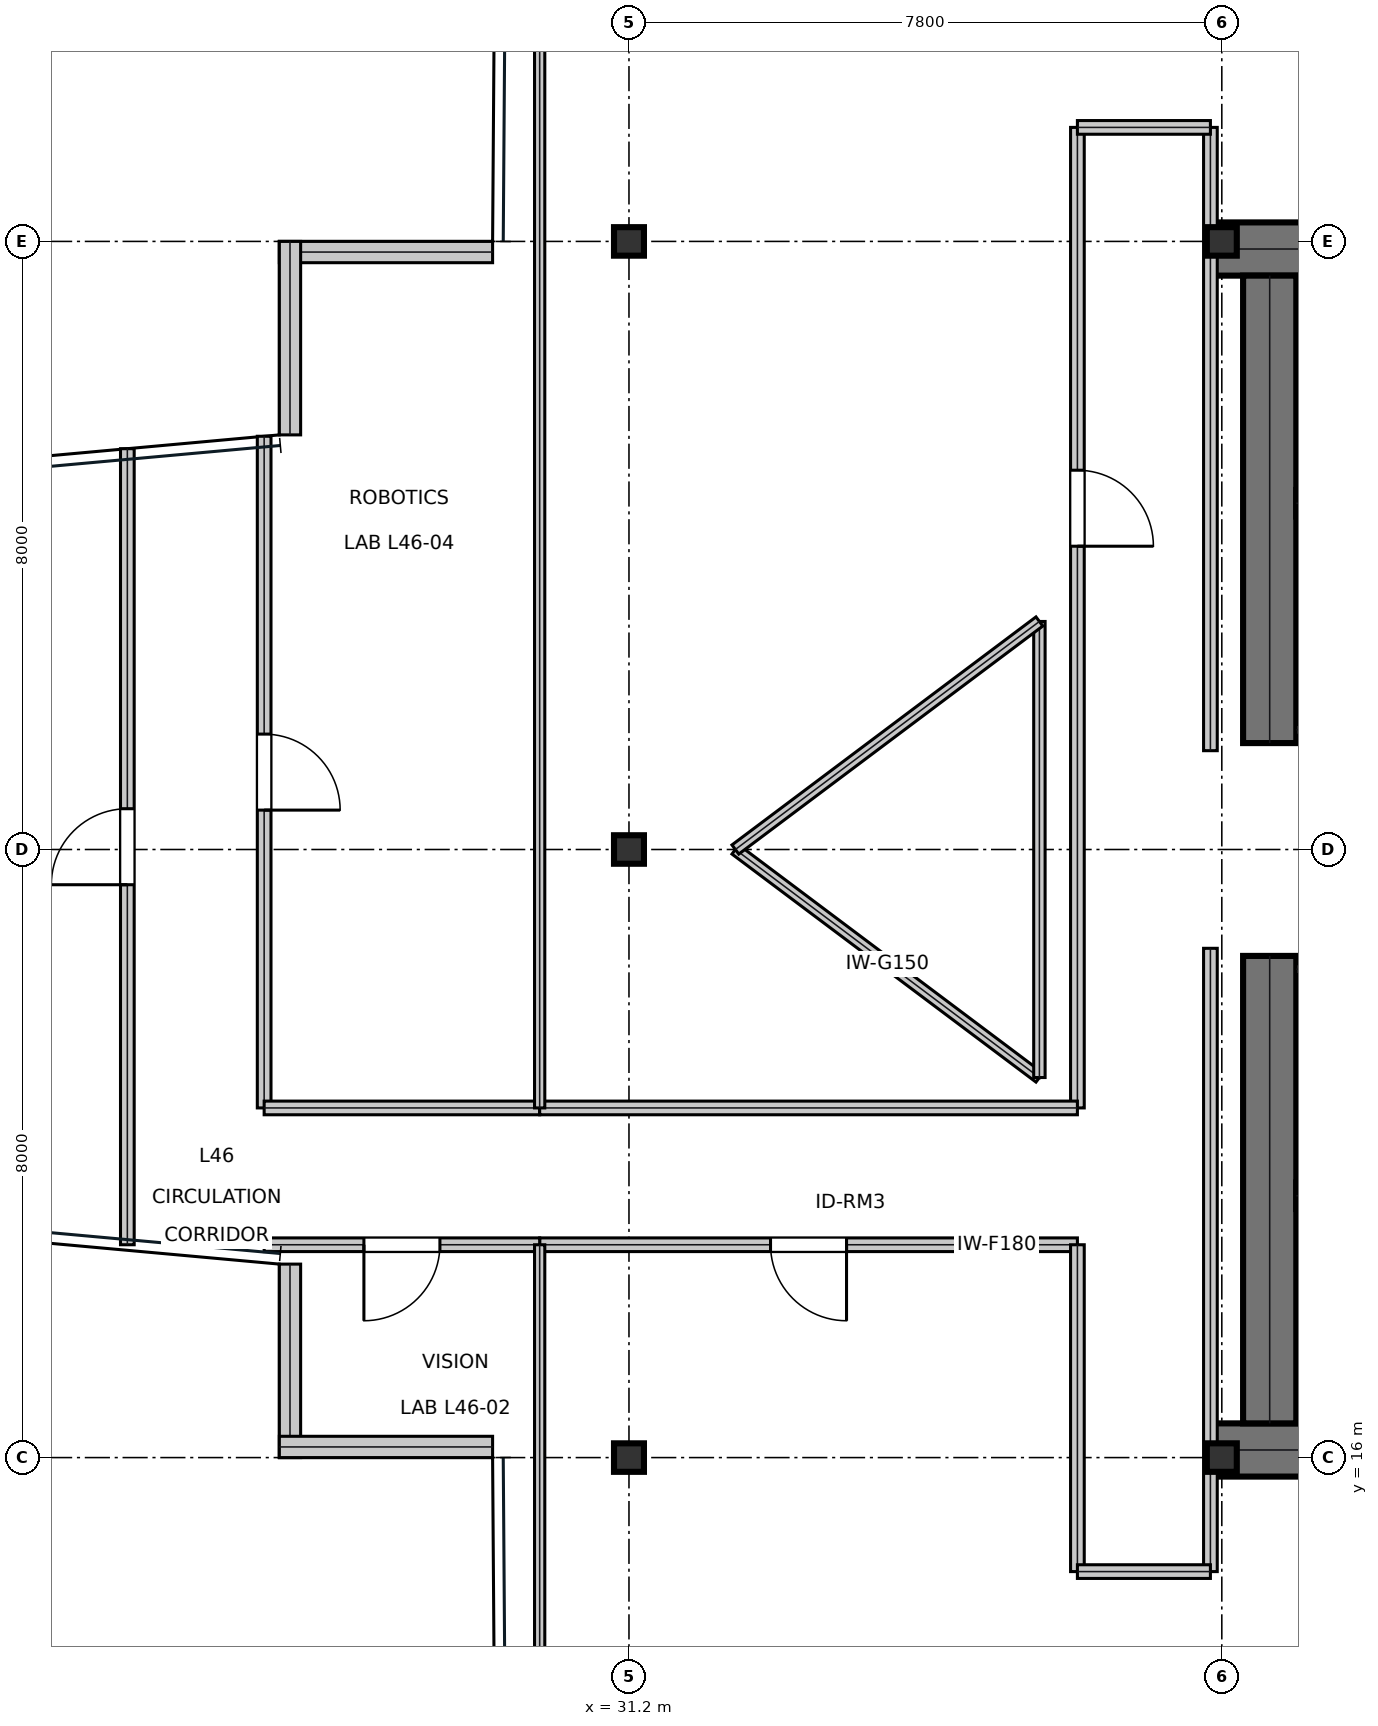
"""IFC4 building model, lengths in metres.
Left out: names, types, materials, properties, quantities, classifications, styles, units other than length and angle.
Written with IfcOpenShell. Run it as: python <this file> out.ifc"""

import sys

from ifc_helpers import new_model, si_unit, direction, frame, frame_2d, origin, origin_2d, place, context, subcontext, project, spatial, rectangle, i_section, extrude, element, fill, save


model = new_model("IFC4")
c1 = context("Model", 3, precision=1e-05, world=origin(), true_north=direction((0.0, 1.0)))
c2 = subcontext(c1, "Body", "Model", "MODEL_VIEW")
j1 = project(units=[si_unit("LENGTHUNIT", "METRE"), si_unit("PLANEANGLEUNIT", "RADIAN")], contexts=[c1])
p1 = place(None, origin())
s1 = spatial("IfcSite", under=j1, at=p1, CompositionType="ELEMENT")
p2 = place(p1, origin())
s2 = spatial("IfcBuilding", under=s1, at=p2, CompositionType="ELEMENT")
p3 = place(p2, frame((0.0, 0.0, 199.95)))
s3 = spatial("IfcBuildingStorey", under=s2, at=p3, CompositionType="ELEMENT", Elevation=199.95)
for number, where, z_axis, x_axis in (
    (1, (38.8, 31.9, 0.0), (0.0, 0.0, 1.0), (1.0, 0.0, 0.0)),
    (2, (38.8, 16.1, 0.0), (0.0, 0.0, 1.0), (1.0, 0.0, 0.0)),
):
    element("IfcWall", number, at=place(p3, frame(where, z_axis=z_axis, x_axis=x_axis)), inside=s3, PredefinedType="SHEAR", context=c2, shape_type="SweptSolid", body=[
        extrude(rectangle(XDim=16.0, YDim=0.7, at=frame_2d((8.0, 0.0))), origin(), (0.0, 0.0, 1.0), 3.79),
    ])
for number, where, z_axis, x_axis in (
    (3, (39.63, 16.45, 0.0), (0.0, 0.0, 1.0), (0.0, 1.0, 0.0)),
    (4, (39.63, 25.4, 0.0), (0.0, 0.0, 1.0), (0.0, 1.0, 0.0)),
):
    element("IfcWall", number, at=place(p3, frame(where, z_axis=z_axis, x_axis=x_axis)), inside=s3, PredefinedType="SHEAR", context=c2, shape_type="SweptSolid", body=[
        extrude(rectangle(XDim=6.15, YDim=0.7, at=frame_2d((3.075, 0.0))), origin(), (0.0, 0.0, 1.0), 3.79),
    ])
p4 = place(p3, frame((39.98, 28.555, 0.0), z_axis=(0.0, 0.0, 1.0), x_axis=(1.0, 0.0, 0.0)))
e5 = element("IfcWall", 5, at=p4, inside=s3, PredefinedType="SHEAR", context=c2, shape_type="SweptSolid", body=[
    extrude(rectangle(XDim=7.71, YDim=0.35, at=frame_2d((3.855, 0.0))), origin(), (0.0, 0.0, 1.0), 3.79),
])
p5 = place(p4, frame((0.25, 0.0, 0.0)))
e6 = element("IfcOpeningElement", 6, at=p5, cuts=e5, PredefinedType="OPENING", context=c2, shape_type="SweptSolid", body=[
    extrude(rectangle(XDim=1.1, YDim=2.15, at=frame_2d((0.55, 1.075))), frame((0.0, 0.185, 0.0), z_axis=(0.0, -1.0, 0.0), x_axis=(1.0, 0.0, 0.0)), (0.0, 0.0, 1.0), 0.37),
])
p6 = place(p3, frame((39.98, 19.445, 0.0), z_axis=(0.0, 0.0, 1.0), x_axis=(1.0, 0.0, 0.0)))
e7 = element("IfcWall", 7, at=p6, inside=s3, PredefinedType="SHEAR", context=c2, shape_type="SweptSolid", body=[
    extrude(rectangle(XDim=7.71, YDim=0.35, at=frame_2d((3.855, 0.0))), origin(), (0.0, 0.0, 1.0), 3.79),
])
p7 = place(p6, frame((0.25, 0.0, 0.0)))
e8 = element("IfcOpeningElement", 8, at=p7, cuts=e7, PredefinedType="OPENING", context=c2, shape_type="SweptSolid", body=[
    extrude(rectangle(XDim=1.1, YDim=2.15, at=frame_2d((0.55, 1.075))), frame((0.0, 0.185, 0.0), z_axis=(0.0, -1.0, 0.0), x_axis=(1.0, 0.0, 0.0)), (0.0, 0.0, 1.0), 0.37),
])
for number, where, z_axis, x_axis in (
    (9, (31.2, 16.0, 0.0), (0.0, 0.0, 1.0), (1.0, 0.0, 0.0)),
    (10, (31.2, 24.0, 0.0), (0.0, 0.0, 1.0), (1.0, 0.0, 0.0)),
    (11, (31.2, 32.0, 0.0), (0.0, 0.0, 1.0), (1.0, 0.0, 0.0)),
    (12, (39.0, 16.0, 0.0), (0.0, 0.0, 1.0), (1.0, 0.0, 0.0)),
    (13, (39.0, 32.0, 0.0), (0.0, 0.0, 1.0), (1.0, 0.0, 0.0)),
):
    element("IfcColumn", number, at=place(p3, frame(where, z_axis=z_axis, x_axis=x_axis)), inside=s3, PredefinedType="COLUMN", context=c2, shape_type="SweptSolid", body=[
        extrude(i_section(OverallWidth=0.394, OverallDepth=0.375, WebThickness=0.017, FlangeThickness=0.028, at=origin_2d()), origin(), (0.0, 0.0, 1.0), 4.044),
    ])
p8 = place(p3, frame((29.406, 31.86, 0.0), z_axis=(0.0, 0.0, 1.0), x_axis=(-1.0, 0.0, 0.0)))
e14 = element("IfcWall", 14, at=p8, inside=s3, PredefinedType="STANDARD", context=c2, shape_type="SweptSolid", body=[
    extrude(rectangle(XDim=2.806, YDim=0.28, at=frame_2d((1.403, 0.0))), origin(), (0.0, 0.0, 1.0), 3.79),
])
for number, where, z_axis, x_axis in (
    (15, (26.74, 32.0, 0.0), (0.0, 0.0, 1.0), (0.0, -1.0, 0.0)),
    (16, (26.74, 18.545, 0.0), (0.0, 0.0, 1.0), (0.0, -1.0, 0.0)),
):
    element("IfcWall", number, at=place(p3, frame(where, z_axis=z_axis, x_axis=x_axis)), inside=s3, PredefinedType="STANDARD", context=c2, shape_type="SweptSolid", body=[
        extrude(rectangle(XDim=2.545, YDim=0.28, at=frame_2d((1.273, 0.0))), origin(), (0.0, 0.0, 1.0), 3.319),
    ])
p9 = place(p3, frame((26.6, 16.14, 0.0), z_axis=(0.0, 0.0, 1.0), x_axis=(1.0, 0.0, 0.0)))
e17 = element("IfcWall", 17, at=p9, inside=s3, PredefinedType="STANDARD", context=c2, shape_type="SweptSolid", body=[
    extrude(rectangle(XDim=2.806, YDim=0.28, at=frame_2d((1.403, 0.0))), origin(), (0.0, 0.0, 1.0), 3.79),
])
p10 = place(p3, frame((39.98, 25.575, 0.0), z_axis=(0.0, 0.0, 1.0), x_axis=(1.0, 0.0, 0.0)))
e18 = element("IfcWall", 18, at=p10, inside=s3, PredefinedType="PARTITIONING", context=c2, shape_type="SweptSolid", body=[
    extrude(rectangle(XDim=5.9, YDim=0.15, at=frame_2d((2.95, 0.0))), origin(), (0.0, 0.0, 1.0), 3.79),
])
p11 = place(p10, frame((2.35, 0.0, 0.0)))
e19 = element("IfcOpeningElement", 19, at=p11, cuts=e18, PredefinedType="OPENING", context=c2, shape_type="SweptSolid", body=[
    extrude(rectangle(XDim=1.05, YDim=2.15, at=frame_2d((0.525, 1.075))), frame((0.0, 0.085, 0.0), z_axis=(0.0, -1.0, 0.0), x_axis=(1.0, 0.0, 0.0)), (0.0, 0.0, 1.0), 0.17),
])
p12 = place(p3, frame((39.98, 22.425, 0.0), z_axis=(0.0, 0.0, 1.0), x_axis=(1.0, 0.0, 0.0)))
e20 = element("IfcWall", 20, at=p12, inside=s3, PredefinedType="PARTITIONING", context=c2, shape_type="SweptSolid", body=[
    extrude(rectangle(XDim=5.9, YDim=0.15, at=frame_2d((2.95, 0.0))), origin(), (0.0, 0.0, 1.0), 3.79),
])
p13 = place(p12, frame((2.35, 0.0, 0.0)))
e21 = element("IfcOpeningElement", 21, at=p13, cuts=e20, PredefinedType="OPENING", context=c2, shape_type="SweptSolid", body=[
    extrude(rectangle(XDim=1.05, YDim=2.15, at=frame_2d((0.525, 1.075))), frame((0.0, 0.085, 0.0), z_axis=(0.0, -1.0, 0.0), x_axis=(1.0, 0.0, 0.0)), (0.0, 0.0, 1.0), 0.17),
])
p14 = place(p3, frame((30.025, 18.8, 0.0), z_axis=(0.0, 0.0, 1.0), x_axis=(1.0, 0.0, 0.0)))
e22 = element("IfcWall", 22, at=p14, inside=s3, PredefinedType="SOLIDWALL", context=c2, shape_type="SweptSolid", body=[
    extrude(rectangle(XDim=7.075, YDim=0.18, at=frame_2d((3.538, 0.0))), origin(), (0.0, 0.0, 1.0), 3.241),
])
p15 = place(p14, frame((3.038, 0.0, 0.0)))
e23 = element("IfcOpeningElement", 23, at=p15, cuts=e22, PredefinedType="OPENING", context=c2, shape_type="SweptSolid", body=[
    extrude(rectangle(XDim=1.0, YDim=2.15, at=frame_2d((0.5, 1.075))), frame((0.0, 0.1, 0.0), z_axis=(0.0, -1.0, 0.0), x_axis=(1.0, 0.0, 0.0)), (0.0, 0.0, 1.0), 0.2),
])
p16 = place(p3, frame((26.4, 18.8, 0.0), z_axis=(0.0, 0.0, 1.0), x_axis=(1.0, 0.0, 0.0)))
e24 = element("IfcWall", 24, at=p16, inside=s3, PredefinedType="SOLIDWALL", context=c2, shape_type="SweptSolid", body=[
    extrude(rectangle(XDim=3.625, YDim=0.18, at=frame_2d((1.812, 0.0))), origin(), (0.0, 0.0, 1.0), 3.79),
])
p17 = place(p16, frame((1.312, 0.0, 0.0)))
e25 = element("IfcOpeningElement", 25, at=p17, cuts=e24, PredefinedType="OPENING", context=c2, shape_type="SweptSolid", body=[
    extrude(rectangle(XDim=1.0, YDim=2.15, at=frame_2d((0.5, 1.075))), frame((0.0, 0.1, 0.0), z_axis=(0.0, -1.0, 0.0), x_axis=(1.0, 0.0, 0.0)), (0.0, 0.0, 1.0), 0.2),
])
p18 = place(p3, frame((24.6, 18.8, 0.0), z_axis=(0.0, 0.0, 1.0), x_axis=(0.0, 1.0, 0.0)))
e26 = element("IfcWall", 26, at=p18, inside=s3, PredefinedType="SOLIDWALL", context=c2, shape_type="SweptSolid", body=[
    extrude(rectangle(XDim=10.473, YDim=0.18, at=frame_2d((5.237, 0.0))), origin(), (0.0, 0.0, 1.0), 3.241),
])
p19 = place(p18, frame((4.737, 0.0, 0.0)))
e27 = element("IfcOpeningElement", 27, at=p19, cuts=e26, PredefinedType="OPENING", context=c2, shape_type="SweptSolid", body=[
    extrude(rectangle(XDim=1.0, YDim=2.15, at=frame_2d((0.5, 1.075))), frame((0.0, 0.1, 0.0), z_axis=(0.0, -1.0, 0.0), x_axis=(1.0, 0.0, 0.0)), (0.0, 0.0, 1.0), 0.2),
])
p20 = place(p3, frame((26.4, 20.6, 0.0), z_axis=(0.0, 0.0, 1.0), x_axis=(0.0, 1.0, 0.0)))
e28 = element("IfcWall", 28, at=p20, inside=s3, PredefinedType="SOLIDWALL", context=c2, shape_type="SweptSolid", body=[
    extrude(rectangle(XDim=8.836, YDim=0.18, at=frame_2d((4.418, 0.0))), origin(), (0.0, 0.0, 1.0), 3.241),
])
p21 = place(p20, frame((3.918, 0.0, 0.0)))
e29 = element("IfcOpeningElement", 29, at=p21, cuts=e28, PredefinedType="OPENING", context=c2, shape_type="SweptSolid", body=[
    extrude(rectangle(XDim=1.0, YDim=2.15, at=frame_2d((0.5, 1.075))), frame((0.0, 0.1, 0.0), z_axis=(0.0, -1.0, 0.0), x_axis=(1.0, 0.0, 0.0)), (0.0, 0.0, 1.0), 0.2),
])
p22 = place(p3, frame((37.1, 20.6, 0.0), z_axis=(0.0, 0.0, 1.0), x_axis=(0.0, 1.0, 0.0)))
e30 = element("IfcWall", 30, at=p22, inside=s3, PredefinedType="SOLIDWALL", context=c2, shape_type="SweptSolid", body=[
    extrude(rectangle(XDim=12.9, YDim=0.18, at=frame_2d((6.45, 0.0))), origin(), (0.0, 0.0, 1.0), 3.241),
])
p23 = place(p22, frame((7.39, 0.0, 0.0)))
e31 = element("IfcOpeningElement", 31, at=p23, cuts=e30, PredefinedType="OPENING", context=c2, shape_type="SweptSolid", body=[
    extrude(rectangle(XDim=1.0, YDim=2.15, at=frame_2d((0.5, 1.075))), frame((0.0, 0.1, 0.0), z_axis=(0.0, -1.0, 0.0), x_axis=(1.0, 0.0, 0.0)), (0.0, 0.0, 1.0), 0.2),
])
p24 = place(p3, frame((38.85, 14.5, 0.0), z_axis=(0.0, 0.0, 1.0), x_axis=(0.0, 1.0, 0.0)))
e32 = element("IfcWall", 32, at=p24, inside=s3, PredefinedType="SOLIDWALL", context=c2, shape_type="SweptSolid", body=[
    extrude(rectangle(XDim=8.2, YDim=0.18, at=frame_2d((4.1, 0.0))), origin(), (0.0, 0.0, 1.0), 3.241),
])
p25 = place(p3, frame((37.1, 14.5, 0.0), z_axis=(0.0, 0.0, 1.0), x_axis=(0.0, 1.0, 0.0)))
e33 = element("IfcWall", 33, at=p25, inside=s3, PredefinedType="SOLIDWALL", context=c2, shape_type="SweptSolid", body=[
    extrude(rectangle(XDim=4.3, YDim=0.18, at=frame_2d((2.15, 0.0))), origin(), (0.0, 0.0, 1.0), 3.241),
])
p26 = place(p3, frame((37.1, 14.5, 0.0), z_axis=(0.0, 0.0, 1.0), x_axis=(1.0, 0.0, 0.0)))
e34 = element("IfcWall", 34, at=p26, inside=s3, PredefinedType="SOLIDWALL", context=c2, shape_type="SweptSolid", body=[
    extrude(rectangle(XDim=1.75, YDim=0.18, at=frame_2d((0.875, 0.0))), origin(), (0.0, 0.0, 1.0), 3.241),
])
p27 = place(p3, frame((26.4, 20.6, 0.0), z_axis=(0.0, 0.0, 1.0), x_axis=(1.0, 0.0, 0.0)))
e35 = element("IfcWall", 35, at=p27, inside=s3, PredefinedType="SOLIDWALL", context=c2, shape_type="SweptSolid", body=[
    extrude(rectangle(XDim=3.625, YDim=0.18, at=frame_2d((1.812, 0.0))), origin(), (0.0, 0.0, 1.0), 3.79),
])
p28 = place(p3, frame((38.85, 25.3, 0.0), z_axis=(0.0, 0.0, 1.0), x_axis=(0.0, 1.0, 0.0)))
e36 = element("IfcWall", 36, at=p28, inside=s3, PredefinedType="SOLIDWALL", context=c2, shape_type="SweptSolid", body=[
    extrude(rectangle(XDim=8.2, YDim=0.18, at=frame_2d((4.1, 0.0))), origin(), (0.0, 0.0, 1.0), 3.241),
])
p29 = place(p3, frame((30.025, 20.6, 0.0), z_axis=(0.0, 0.0, 1.0), x_axis=(1.0, 0.0, 0.0)))
e37 = element("IfcWall", 37, at=p29, inside=s3, PredefinedType="SOLIDWALL", context=c2, shape_type="SweptSolid", body=[
    extrude(rectangle(XDim=7.075, YDim=0.18, at=frame_2d((3.538, 0.0))), origin(), (0.0, 0.0, 1.0), 3.241),
])
p30 = place(p3, frame((37.1, 33.5, 0.0), z_axis=(0.0, 0.0, 1.0), x_axis=(1.0, 0.0, 0.0)))
e38 = element("IfcWall", 38, at=p30, inside=s3, PredefinedType="SOLIDWALL", context=c2, shape_type="SweptSolid", body=[
    extrude(rectangle(XDim=1.75, YDim=0.18, at=frame_2d((0.875, 0.0))), origin(), (0.0, 0.0, 1.0), 3.241),
])
p31 = place(p3, frame((30.025, 7.805, 0.0), z_axis=(0.0, 0.0, 1.0), x_axis=(0.0, 1.0, 0.0)))
e39 = element("IfcWall", 39, at=p31, inside=s3, PredefinedType="PARTITIONING", context=c2, shape_type="SweptSolid", body=[
    extrude(rectangle(XDim=10.995, YDim=0.135, at=frame_2d((5.498, 0.0))), origin(), (0.0, 0.0, 1.0), 3.319),
])
p32 = place(p3, frame((30.025, 20.6, 0.0), z_axis=(0.0, 0.0, 1.0), x_axis=(0.0, 1.0, 0.0)))
e40 = element("IfcWall", 40, at=p32, inside=s3, PredefinedType="PARTITIONING", context=c2, shape_type="SweptSolid", body=[
    extrude(rectangle(XDim=19.595, YDim=0.135, at=frame_2d((9.797, 0.0))), origin(), (0.0, 0.0, 1.0), 3.241),
])
p33 = place(p3, frame((32.6, 24.0, 0.0), z_axis=(0.0, 0.0, 1.0), x_axis=(0.8, -0.6, 0.0)))
e41 = element("IfcWall", 41, at=p33, inside=s3, PredefinedType="MOVABLE", context=c2, shape_type="SweptSolid", body=[
    extrude(rectangle(XDim=5.0, YDim=0.15, at=frame_2d((2.5, 0.0))), origin(), (0.0, 0.0, 1.0), 3.79),
])
p34 = place(p3, frame((36.6, 21.0, 0.0), z_axis=(0.0, 0.0, 1.0), x_axis=(0.0, 1.0, 0.0)))
e42 = element("IfcWall", 42, at=p34, inside=s3, PredefinedType="MOVABLE", context=c2, shape_type="SweptSolid", body=[
    extrude(rectangle(XDim=6.0, YDim=0.15, at=frame_2d((3.0, 0.0))), origin(), (0.0, 0.0, 1.0), 3.79),
])
p35 = place(p3, frame((36.6, 27.0, 0.0), z_axis=(0.0, 0.0, 1.0), x_axis=(-0.8, -0.6, 0.0)))
e43 = element("IfcWall", 43, at=p35, inside=s3, PredefinedType="MOVABLE", context=c2, shape_type="SweptSolid", body=[
    extrude(rectangle(XDim=5.0, YDim=0.15, at=frame_2d((2.5, 0.0))), origin(), (0.0, 0.0, 1.0), 3.79),
])
p36 = place(p15, frame((1.0, 0.0, 0.0), z_axis=(0.0, 0.0, 1.0), x_axis=(-1.0, 0.0, 0.0)))
e44 = element("IfcDoor", 44, at=p36, inside=s3, OperationType="SINGLE_SWING_LEFT", PredefinedType="DOOR", context=c2, shape_type="SweptSolid", body=[
    extrude(rectangle(XDim=1.0, YDim=2.15, at=frame_2d((0.5, 1.075))), frame((0.0, 0.025, 0.0), z_axis=(0.0, -1.0, 0.0), x_axis=(1.0, 0.0, 0.0)), (0.0, 0.0, 1.0), 0.05),
])
fill(e23, e44)
p37 = place(p17, frame((1.0, 0.0, 0.0), z_axis=(0.0, 0.0, 1.0), x_axis=(-1.0, 0.0, 0.0)))
e45 = element("IfcDoor", 45, at=p37, inside=s3, OperationType="SINGLE_SWING_RIGHT", PredefinedType="DOOR", context=c2, shape_type="SweptSolid", body=[
    extrude(rectangle(XDim=1.0, YDim=2.15, at=frame_2d((0.5, 1.075))), frame((0.0, 0.025, 0.0), z_axis=(0.0, -1.0, 0.0), x_axis=(1.0, 0.0, 0.0)), (0.0, 0.0, 1.0), 0.05),
])
fill(e25, e45)
p38 = place(p19, origin())
e46 = element("IfcDoor", 46, at=p38, inside=s3, OperationType="SINGLE_SWING_LEFT", PredefinedType="DOOR", context=c2, shape_type="SweptSolid", body=[
    extrude(rectangle(XDim=1.0, YDim=2.15, at=frame_2d((0.5, 1.075))), frame((0.0, 0.025, 0.0), z_axis=(0.0, -1.0, 0.0), x_axis=(1.0, 0.0, 0.0)), (0.0, 0.0, 1.0), 0.05),
])
fill(e27, e46)
p39 = place(p21, frame((1.0, 0.0, 0.0), z_axis=(0.0, 0.0, 1.0), x_axis=(-1.0, 0.0, 0.0)))
e47 = element("IfcDoor", 47, at=p39, inside=s3, OperationType="SINGLE_SWING_RIGHT", PredefinedType="DOOR", context=c2, shape_type="SweptSolid", body=[
    extrude(rectangle(XDim=1.0, YDim=2.15, at=frame_2d((0.5, 1.075))), frame((0.0, 0.025, 0.0), z_axis=(0.0, -1.0, 0.0), x_axis=(1.0, 0.0, 0.0)), (0.0, 0.0, 1.0), 0.05),
])
fill(e29, e47)
p40 = place(p23, frame((1.0, 0.0, 0.0), z_axis=(0.0, 0.0, 1.0), x_axis=(-1.0, 0.0, 0.0)))
e48 = element("IfcDoor", 48, at=p40, inside=s3, OperationType="SINGLE_SWING_RIGHT", PredefinedType="DOOR", context=c2, shape_type="SweptSolid", body=[
    extrude(rectangle(XDim=1.0, YDim=2.15, at=frame_2d((0.5, 1.075))), frame((0.0, 0.025, 0.0), z_axis=(0.0, -1.0, 0.0), x_axis=(1.0, 0.0, 0.0)), (0.0, 0.0, 1.0), 0.05),
])
fill(e31, e48)
save(model, sys.argv[1])
